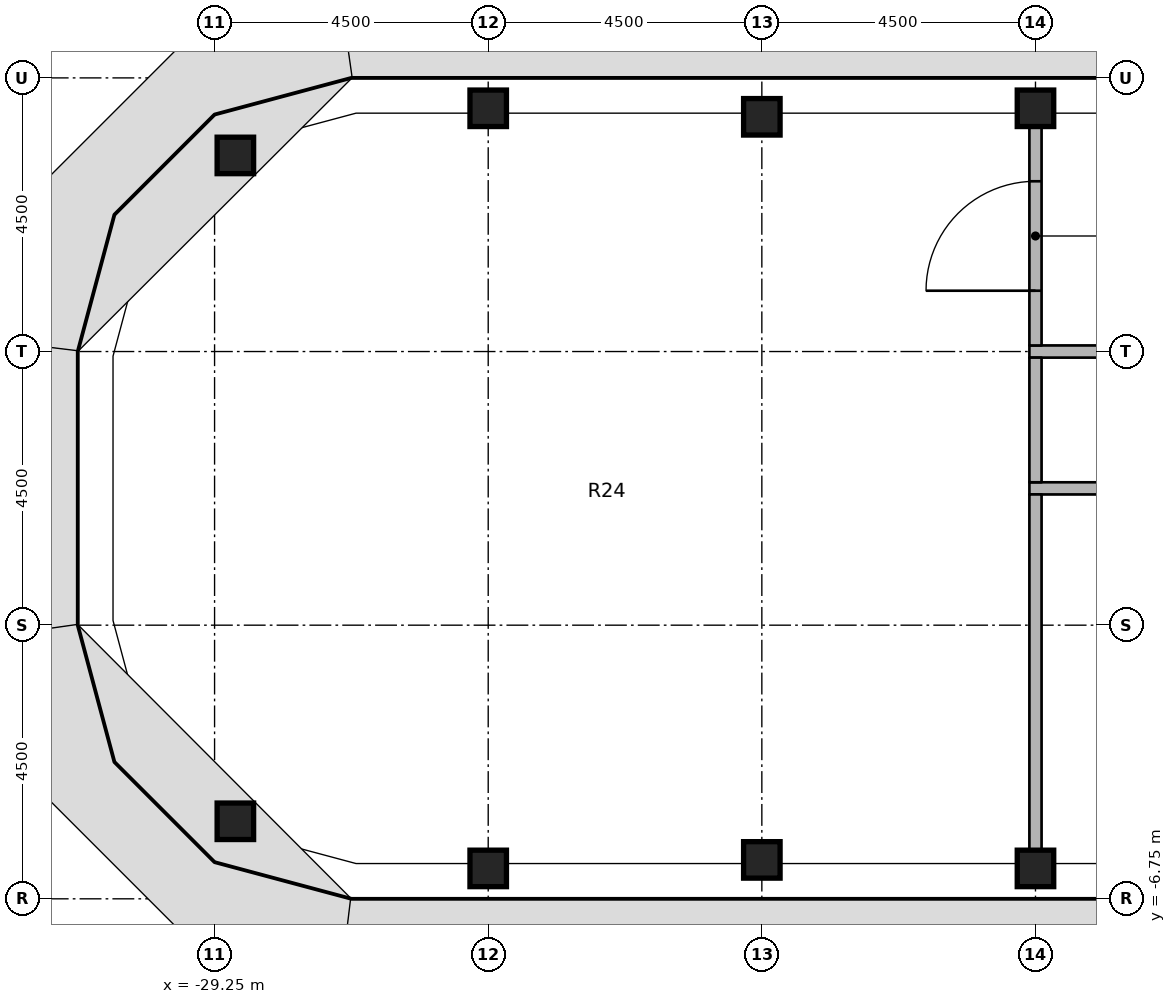
"""IFC4 building model, lengths in metres.
Left out: names, types, materials, properties, quantities, classifications, styles, units other than length and angle.
Written with IfcOpenShell. Run it as: python <this file> out.ifc"""

import sys

from ifc_helpers import new_model, si_unit, direction, frame, frame_2d, origin, origin_2d, place, context, subcontext, project, spatial, rectangle, extrude, element, fill, save


model = new_model("IFC4")
c1 = context("Model", 3, precision=1e-05, world=origin(), true_north=direction((0.0, 1.0)))
c2 = subcontext(c1, "Body", "Model", "MODEL_VIEW")
j1 = project(units=[si_unit("LENGTHUNIT", "METRE"), si_unit("PLANEANGLEUNIT", "RADIAN")], contexts=[c1])
p1 = place(None, origin())
s1 = spatial("IfcSite", under=j1, at=p1, CompositionType="ELEMENT")
p2 = place(p1, origin())
s2 = spatial("IfcBuilding", under=s1, at=p2, CompositionType="ELEMENT")
p3 = place(p2, frame((0.0, 0.0, 253.6)))
s3 = spatial("IfcBuildingStorey", under=s2, at=p3, CompositionType="ELEMENT", Elevation=253.6)
for number, where, z_axis, x_axis in (
    (1, (-28.908, -5.475, 0.0), (0.0, 0.0, 1.0), (1.0, 0.0, 0.0)),
    (2, (-28.908, 5.475, 0.0), (0.0, 0.0, 1.0), (1.0, 0.0, 0.0)),
    (3, (-24.75, -6.25, 0.0), (0.0, 0.0, 1.0), (1.0, 0.0, 0.0)),
    (4, (-24.75, 6.25, 0.0), (0.0, 0.0, 1.0), (1.0, 0.0, 0.0)),
    (5, (-20.25, -6.11, 0.0), (0.0, 0.0, 1.0), (1.0, 0.0, 0.0)),
    (6, (-20.25, 6.11, 0.0), (0.0, 0.0, 1.0), (1.0, 0.0, 0.0)),
    (7, (-15.75, -6.25, 0.0), (0.0, 0.0, 1.0), (1.0, 0.0, 0.0)),
    (8, (-15.75, 6.25, 0.0), (0.0, 0.0, 1.0), (1.0, 0.0, 0.0)),
):
    element("IfcColumn", number, at=place(p3, frame(where, z_axis=z_axis, x_axis=x_axis)), inside=s3, PredefinedType="COLUMN", context=c2, shape_type="SweptSolid", body=[
        extrude(rectangle(XDim=0.6, YDim=0.6, at=origin_2d()), origin(), (0.0, 0.0, 1.0), 3.65),
    ])
p4 = place(p3, frame((-15.85, 2.25, 0.0), z_axis=(0.0, 0.0, 1.0), x_axis=(1.0, 0.0, 0.0)))
e9 = element("IfcWall", 9, at=p4, inside=s3, PredefinedType="PARTITIONING", context=c2, shape_type="SweptSolid", body=[
    extrude(rectangle(XDim=4.7, YDim=0.2, at=frame_2d((2.35, 0.0))), origin(), (0.0, 0.0, 1.0), 2.75),
])
p5 = place(p4, frame((1.85, 0.0, 0.0)))
e10 = element("IfcOpeningElement", 10, at=p5, cuts=e9, PredefinedType="OPENING", context=c2, shape_type="SweptSolid", body=[
    extrude(rectangle(XDim=1.0, YDim=2.1, at=frame_2d((0.5, 1.05))), frame((0.0, 0.11, 0.0), z_axis=(0.0, -1.0, 0.0), x_axis=(1.0, 0.0, 0.0)), (0.0, 0.0, 1.0), 0.22),
])
p6 = place(p3, frame((-11.15, 0.0, 0.0), z_axis=(0.0, 0.0, 1.0), x_axis=(-1.0, 0.0, 0.0)))
e11 = element("IfcWall", 11, at=p6, inside=s3, PredefinedType="PARTITIONING", context=c2, shape_type="SweptSolid", body=[
    extrude(rectangle(XDim=4.7, YDim=0.2, at=frame_2d((2.35, 0.0))), origin(), (0.0, 0.0, 1.0), 2.75),
])
p7 = place(p6, frame((1.85, 0.0, 0.0)))
e12 = element("IfcOpeningElement", 12, at=p7, cuts=e11, PredefinedType="OPENING", context=c2, shape_type="SweptSolid", body=[
    extrude(rectangle(XDim=1.0, YDim=2.1, at=frame_2d((0.5, 1.05))), frame((0.0, 0.11, 0.0), z_axis=(0.0, -1.0, 0.0), x_axis=(1.0, 0.0, 0.0)), (0.0, 0.0, 1.0), 0.22),
])
p8 = place(p3, frame((-15.75, 0.1, 0.0), z_axis=(0.0, 0.0, 1.0), x_axis=(0.0, 1.0, 0.0)))
e13 = element("IfcWall", 13, at=p8, inside=s3, PredefinedType="PARTITIONING", context=c2, shape_type="SweptSolid", body=[
    extrude(rectangle(XDim=2.05, YDim=0.2, at=frame_2d((1.025, 0.0))), origin(), (0.0, 0.0, 1.0), 2.75),
])
p9 = place(p3, frame((-15.75, 2.35, 0.0), z_axis=(0.0, 0.0, 1.0), x_axis=(0.0, 1.0, 0.0)))
e14 = element("IfcWall", 14, at=p9, inside=s3, PredefinedType="PARTITIONING", context=c2, shape_type="SweptSolid", body=[
    extrude(rectangle(XDim=3.6, YDim=0.2, at=frame_2d((1.8, 0.0))), origin(), (0.0, 0.0, 1.0), 2.75),
])
p10 = place(p9, frame((0.9, 0.0, 0.0)))
e15 = element("IfcOpeningElement", 15, at=p10, cuts=e14, PredefinedType="OPENING", context=c2, shape_type="SweptSolid", body=[
    extrude(rectangle(XDim=1.8, YDim=2.1, at=frame_2d((0.9, 1.05))), frame((0.0, 0.11, 0.0), z_axis=(0.0, -1.0, 0.0), x_axis=(1.0, 0.0, 0.0)), (0.0, 0.0, 1.0), 0.22),
])
p11 = place(p3, frame((-15.75, -5.95, 0.0), z_axis=(0.0, 0.0, 1.0), x_axis=(0.0, 1.0, 0.0)))
e16 = element("IfcWall", 16, at=p11, inside=s3, PredefinedType="PARTITIONING", context=c2, shape_type="SweptSolid", body=[
    extrude(rectangle(XDim=5.85, YDim=0.2, at=frame_2d((2.925, 0.0))), origin(), (0.0, 0.0, 1.0), 2.75),
])
p12 = place(p10, origin())
e17 = element("IfcDoor", 17, at=p12, inside=s3, OperationType="DOUBLE_DOOR_SINGLE_SWING", PredefinedType="DOOR", context=c2, shape_type="SweptSolid", body=[
    extrude(rectangle(XDim=1.8, YDim=2.1, at=frame_2d((0.9, 1.05))), frame((0.0, 0.025, 0.0), z_axis=(0.0, -1.0, 0.0), x_axis=(1.0, 0.0, 0.0)), (0.0, 0.0, 1.0), 0.05),
])
fill(e15, e17)
save(model, sys.argv[1])
